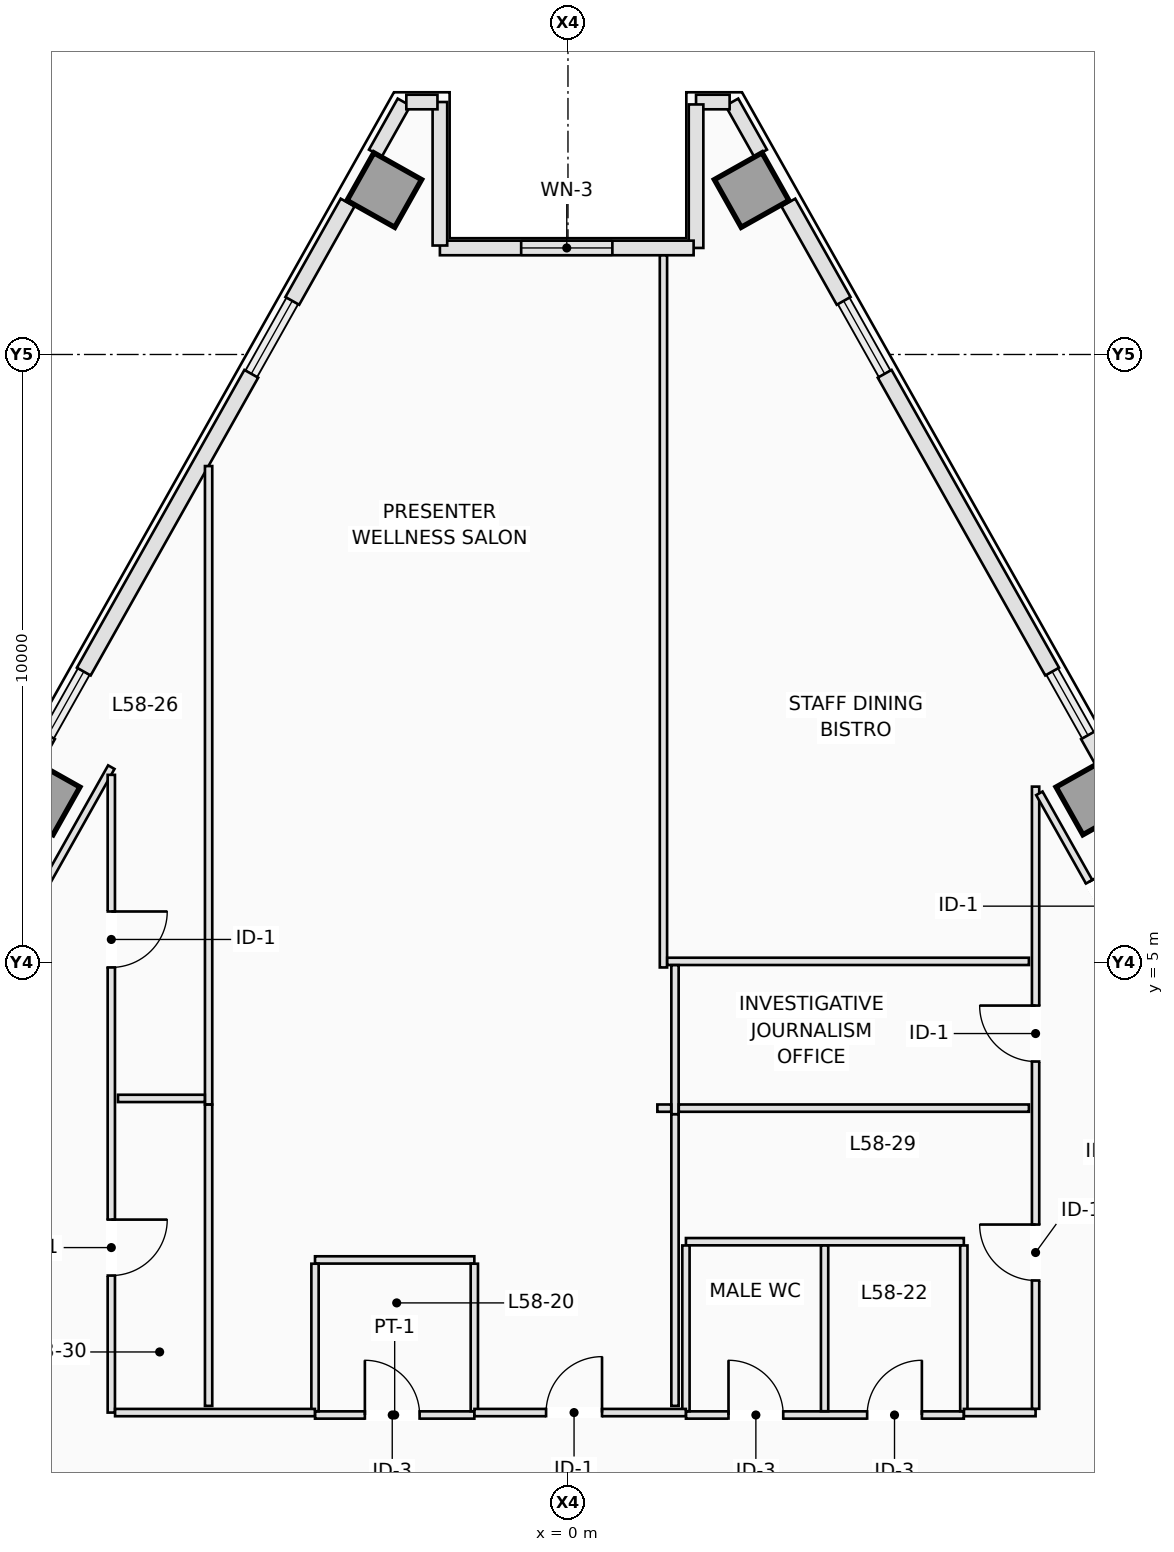
"""IFC4 building model, lengths in metres.
Left out: names, types, materials, properties, quantities, classifications, styles, units other than length and angle.
Written with IfcOpenShell. Run it as: python <this file> out.ifc"""

import sys

from ifc_helpers import new_model, si_unit, direction, frame, frame_2d, origin, origin_2d, place, context, subcontext, project, spatial, rectangle, extrude, element, fill, save


model = new_model("IFC4")
c1 = context("Model", 3, precision=1e-05, world=origin(), true_north=direction((0.0, 1.0)))
c2 = subcontext(c1, "Body", "Model", "MODEL_VIEW")
j1 = project(units=[si_unit("LENGTHUNIT", "METRE"), si_unit("PLANEANGLEUNIT", "RADIAN")], contexts=[c1])
p1 = place(None, origin())
s1 = spatial("IfcSite", under=j1, at=p1, CompositionType="ELEMENT")
p2 = place(p1, origin())
s2 = spatial("IfcBuilding", under=s1, at=p2, CompositionType="ELEMENT")
p3 = place(p2, frame((0.0, 0.0, 211.4)))
s3 = spatial("IfcBuildingStorey", under=s2, at=p3, CompositionType="ELEMENT", Elevation=211.4)
for number, where, z_axis, x_axis in (
    (1, (8.64, 7.715, 0.0), (0.0, 0.0, 1.0), (0.872, 0.49, 0.0)),
    (2, (3.021, 17.704, 0.0), (0.0, 0.0, 1.0), (0.872, 0.49, 0.0)),
    (3, (-3.021, 17.704, 0.0), (0.0, 0.0, 1.0), (-0.872, 0.49, 0.0)),
    (4, (-8.64, 7.715, 0.0), (0.0, 0.0, 1.0), (-0.872, 0.49, 0.0)),
):
    element("IfcColumn", number, at=place(p3, frame(where, z_axis=z_axis, x_axis=x_axis)), inside=s3, PredefinedType="COLUMN", context=c2, shape_type="SweptSolid", body=[
        extrude(rectangle(XDim=0.9, YDim=0.9, at=origin_2d()), origin(), (0.0, 0.0, 1.0), 3.5),
    ])
p4 = place(p3, frame((2.695, 19.149, 0.0), z_axis=(0.0, 0.0, 1.0), x_axis=(0.490345412687, -0.87152818443, 0.0)))
e5 = element("IfcWall", 5, at=p4, inside=s3, PredefinedType="STANDARD", context=c2, shape_type="SweptSolid", body=[
    extrude(rectangle(XDim=0.964, YDim=0.24, at=frame_2d((0.482, 0.0))), origin(), (0.0, 0.0, 1.0), 3.25),
])
p5 = place(p3, frame((3.624, 17.499, 0.0), z_axis=(0.0, 0.0, 1.0), x_axis=(0.490261239633, -0.871575537125, 0.0)))
e6 = element("IfcWall", 6, at=p5, inside=s3, PredefinedType="STANDARD", context=c2, shape_type="SweptSolid", body=[
    extrude(rectangle(XDim=1.855, YDim=0.26, at=frame_2d((0.928, 0.0))), origin(), (0.0, 0.0, 1.0), 3.25),
])
p6 = place(p3, frame((5.208, 14.682, 0.0), z_axis=(0.0, 0.0, 1.0), x_axis=(0.490240608828, -0.871587141631, 0.0)))
e7 = element("IfcWall", 7, at=p6, inside=s3, PredefinedType="STANDARD", context=c2, shape_type="SweptSolid", body=[
    extrude(rectangle(XDim=5.618, YDim=0.26, at=frame_2d((2.809, 0.0))), origin(), (0.0, 0.0, 1.0), 3.25),
])
p7 = place(p3, frame((8.552, 8.738, 0.0), z_axis=(0.0, 0.0, 1.0), x_axis=(0.490412424957, -0.871490478116, 0.0)))
e8 = element("IfcWall", 8, at=p7, inside=s3, PredefinedType="STANDARD", context=c2, shape_type="SweptSolid", body=[
    extrude(rectangle(XDim=0.46, YDim=0.26, at=frame_2d((0.23, 0.0))), origin(), (0.0, 0.0, 1.0), 3.25),
])
p8 = place(p3, frame((-3.168, 18.309, 0.0), z_axis=(0.0, 0.0, 1.0), x_axis=(0.490345412687, 0.87152818443, 0.0)))
e9 = element("IfcWall", 9, at=p8, inside=s3, PredefinedType="STANDARD", context=c2, shape_type="SweptSolid", body=[
    extrude(rectangle(XDim=0.964, YDim=0.24, at=frame_2d((0.482, 0.0))), origin(), (0.0, 0.0, 1.0), 3.25),
])
p9 = place(p3, frame((-8.777, 8.337, 0.0), z_axis=(0.0, 0.0, 1.0), x_axis=(0.490412424957, 0.871490478116, 0.0)))
e10 = element("IfcWall", 10, at=p9, inside=s3, PredefinedType="STANDARD", context=c2, shape_type="SweptSolid", body=[
    extrude(rectangle(XDim=0.46, YDim=0.26, at=frame_2d((0.23, 0.0))), origin(), (0.0, 0.0, 1.0), 3.25),
])
p10 = place(p3, frame((-7.962, 9.785, 0.0), z_axis=(0.0, 0.0, 1.0), x_axis=(0.490240608828, 0.871587141631, 0.0)))
e11 = element("IfcWall", 11, at=p10, inside=s3, PredefinedType="STANDARD", context=c2, shape_type="SweptSolid", body=[
    extrude(rectangle(XDim=5.618, YDim=0.26, at=frame_2d((2.809, 0.0))), origin(), (0.0, 0.0, 1.0), 3.25),
])
p11 = place(p3, frame((-4.533, 15.882, 0.0), z_axis=(0.0, 0.0, 1.0), x_axis=(0.490261239633, 0.871575537125, 0.0)))
e12 = element("IfcWall", 12, at=p11, inside=s3, PredefinedType="STANDARD", context=c2, shape_type="SweptSolid", body=[
    extrude(rectangle(XDim=1.855, YDim=0.26, at=frame_2d((0.928, 0.0))), origin(), (0.0, 0.0, 1.0), 3.25),
])
p12 = place(p3, frame((2.658, 19.152, 0.0), z_axis=(0.0, 0.0, 1.0), x_axis=(-1.0, 0.0, 0.0)))
e13 = element("IfcWall", 13, at=p12, inside=s3, PredefinedType="STANDARD", context=c2, shape_type="SweptSolid", body=[
    extrude(rectangle(XDim=0.552, YDim=0.24, at=frame_2d((0.276, 0.0))), origin(), (0.0, 0.0, 1.0), 3.25),
])
p13 = place(p3, frame((2.106, 19.112, 0.0), z_axis=(0.0, 0.0, 1.0), x_axis=(0.0, -1.0, 0.0)))
e14 = element("IfcWall", 14, at=p13, inside=s3, PredefinedType="STANDARD", context=c2, shape_type="SweptSolid", body=[
    extrude(rectangle(XDim=2.36, YDim=0.24, at=frame_2d((1.18, 0.0))), origin(), (0.0, 0.0, 1.0), 3.25),
])
p14 = place(p3, frame((2.066, 16.752, 0.0), z_axis=(0.0, 0.0, 1.0), x_axis=(-1.0, 0.0, 0.0)))
e15 = element("IfcWall", 15, at=p14, inside=s3, PredefinedType="STANDARD", context=c2, shape_type="SweptSolid", body=[
    extrude(rectangle(XDim=4.172, YDim=0.24, at=frame_2d((2.086, 0.0))), origin(), (0.0, 0.0, 1.0), 3.25),
])
p15 = place(p14, frame((1.336, 0.0, 0.9)))
e16 = element("IfcOpeningElement", 16, at=p15, cuts=e15, PredefinedType="OPENING", context=c2, shape_type="SweptSolid", body=[
    extrude(rectangle(XDim=1.5, YDim=1.95, at=frame_2d((0.75, 0.975))), frame((0.0, 0.13, 0.0), z_axis=(0.0, -1.0, 0.0), x_axis=(1.0, 0.0, 0.0)), (0.0, 0.0, 1.0), 0.26),
])
p16 = place(p3, frame((-2.106, 16.792, 0.0), z_axis=(0.0, 0.0, 1.0), x_axis=(0.0, 1.0, 0.0)))
e17 = element("IfcWall", 17, at=p16, inside=s3, PredefinedType="STANDARD", context=c2, shape_type="SweptSolid", body=[
    extrude(rectangle(XDim=2.36, YDim=0.24, at=frame_2d((1.18, 0.0))), origin(), (0.0, 0.0, 1.0), 3.25),
])
p17 = place(p3, frame((-2.146, 19.152, 0.0), z_axis=(0.0, 0.0, 1.0), x_axis=(-1.0, 0.0, 0.0)))
e18 = element("IfcWall", 18, at=p17, inside=s3, PredefinedType="STANDARD", context=c2, shape_type="SweptSolid", body=[
    extrude(rectangle(XDim=0.512, YDim=0.24, at=frame_2d((0.256, 0.0))), origin(), (0.0, 0.0, 1.0), 3.25),
])
p18 = place(p3, frame((-4.16, -2.44, 0.0), z_axis=(0.0, 0.0, 1.0), x_axis=(1.0, 0.0, 0.0)))
e19 = element("IfcWall", 19, at=p18, inside=s3, PredefinedType="PARTITIONING", context=c2, shape_type="SweptSolid", body=[
    extrude(rectangle(XDim=2.62, YDim=0.12, at=frame_2d((1.31, 0.0))), origin(), (0.0, 0.0, 1.0), 2.943),
])
p19 = place(p18, frame((0.82, 0.0, 0.0)))
e20 = element("IfcOpeningElement", 20, at=p19, cuts=e19, PredefinedType="OPENING", context=c2, shape_type="SweptSolid", body=[
    extrude(rectangle(XDim=0.9, YDim=2.12, at=frame_2d((0.45, 1.06))), frame((0.0, 0.07, 0.0), z_axis=(0.0, -1.0, 0.0), x_axis=(1.0, 0.0, 0.0)), (0.0, 0.0, 1.0), 0.14),
])
p20 = place(p3, frame((-4.16, 0.11, 0.0), z_axis=(0.0, 0.0, 1.0), x_axis=(1.0, 0.0, 0.0)))
e21 = element("IfcWall", 21, at=p20, inside=s3, PredefinedType="PARTITIONING", context=c2, shape_type="SweptSolid", body=[
    extrude(rectangle(XDim=2.62, YDim=0.12, at=frame_2d((1.31, 0.0))), origin(), (0.0, 0.0, 1.0), 3.25),
])
for number, where, z_axis, x_axis in (
    (22, (-4.16, -2.378, 0.0), (0.0, 0.0, 1.0), (0.0, 1.0, 0.0)),
    (23, (-1.54, -2.378, 0.0), (0.0, 0.0, 1.0), (0.0, 1.0, 0.0)),
):
    element("IfcWall", number, at=place(p3, frame(where, z_axis=z_axis, x_axis=x_axis)), inside=s3, PredefinedType="PARTITIONING", context=c2, shape_type="SweptSolid", body=[
        extrude(rectangle(XDim=2.426, YDim=0.12, at=frame_2d((1.213, 0.0))), origin(), (0.0, 0.0, 1.0), 3.25),
    ])
p21 = place(p3, frame((1.94, -2.44, 0.0), z_axis=(0.0, 0.0, 1.0), x_axis=(1.0, 0.0, 0.0)))
e24 = element("IfcWall", 24, at=p21, inside=s3, PredefinedType="PARTITIONING", context=c2, shape_type="SweptSolid", body=[
    extrude(rectangle(XDim=4.57, YDim=0.12, at=frame_2d((2.285, 0.0))), origin(), (0.0, 0.0, 1.0), 2.943),
])
p22 = place(p21, frame((0.7, 0.0, 0.0)))
e25 = element("IfcOpeningElement", 25, at=p22, cuts=e24, PredefinedType="OPENING", context=c2, shape_type="SweptSolid", body=[
    extrude(rectangle(XDim=0.9, YDim=2.12, at=frame_2d((0.45, 1.06))), frame((0.0, 0.07, 0.0), z_axis=(0.0, -1.0, 0.0), x_axis=(1.0, 0.0, 0.0)), (0.0, 0.0, 1.0), 0.14),
])
p23 = place(p21, frame((2.98, 0.0, 0.0)))
e26 = element("IfcOpeningElement", 26, at=p23, cuts=e24, PredefinedType="OPENING", context=c2, shape_type="SweptSolid", body=[
    extrude(rectangle(XDim=0.9, YDim=2.12, at=frame_2d((0.45, 1.06))), frame((0.0, 0.07, 0.0), z_axis=(0.0, -1.0, 0.0), x_axis=(1.0, 0.0, 0.0)), (0.0, 0.0, 1.0), 0.14),
])
p24 = place(p3, frame((1.94, 0.41, 0.0), z_axis=(0.0, 0.0, 1.0), x_axis=(1.0, 0.0, 0.0)))
e27 = element("IfcWall", 27, at=p24, inside=s3, PredefinedType="PARTITIONING", context=c2, shape_type="SweptSolid", body=[
    extrude(rectangle(XDim=4.57, YDim=0.12, at=frame_2d((2.285, 0.0))), origin(), (0.0, 0.0, 1.0), 3.25),
])
for number, where, z_axis, x_axis in (
    (28, (1.94, -2.378, 0.0), (0.0, 0.0, 1.0), (0.0, 1.0, 0.0)),
    (29, (4.22, -2.378, 0.0), (0.0, 0.0, 1.0), (0.0, 1.0, 0.0)),
    (30, (6.51, -2.378, 0.0), (0.0, 0.0, 1.0), (0.0, 1.0, 0.0)),
):
    element("IfcWall", number, at=place(p3, frame(where, z_axis=z_axis, x_axis=x_axis)), inside=s3, PredefinedType="PARTITIONING", context=c2, shape_type="SweptSolid", body=[
        extrude(rectangle(XDim=2.726, YDim=0.12, at=frame_2d((1.363, 0.0))), origin(), (0.0, 0.0, 1.0), 3.25),
    ])
p25 = place(p3, frame((-9.409, 4.838, 0.0), z_axis=(0.0, 0.0, 1.0), x_axis=(0.490276203052, 0.871567120032, 0.0)))
e31 = element("IfcWall", 31, at=p25, inside=s3, PredefinedType="PARTITIONING", context=c2, shape_type="SweptSolid", body=[
    extrude(rectangle(XDim=3.873, YDim=0.12, at=frame_2d((1.937, 0.0))), origin(), (0.0, 0.0, 1.0), 3.25),
])
p26 = place(p3, frame((-7.51, 8.087, 0.0), z_axis=(0.0, 0.0, 1.0), x_axis=(0.0, -1.0, 0.0)))
e32 = element("IfcWall", 32, at=p26, inside=s3, PredefinedType="PARTITIONING", context=c2, shape_type="SweptSolid", body=[
    extrude(rectangle(XDim=10.487, YDim=0.12, at=frame_2d((5.244, 0.0))), origin(), (0.0, 0.0, 1.0), 3.25),
])
p27 = place(p26, frame((2.247, 0.0, 0.0)))
e33 = element("IfcOpeningElement", 33, at=p27, cuts=e32, PredefinedType="OPENING", context=c2, shape_type="SweptSolid", body=[
    extrude(rectangle(XDim=0.92, YDim=2.12, at=frame_2d((0.46, 1.06))), frame((0.0, 0.07, 0.0), z_axis=(0.0, -1.0, 0.0), x_axis=(1.0, 0.0, 0.0)), (0.0, 0.0, 1.0), 0.14),
])
p28 = place(p26, frame((7.314, 0.0, 0.0)))
e34 = element("IfcOpeningElement", 34, at=p28, cuts=e32, PredefinedType="OPENING", context=c2, shape_type="SweptSolid", body=[
    extrude(rectangle(XDim=0.92, YDim=2.12, at=frame_2d((0.46, 1.06))), frame((0.0, 0.07, 0.0), z_axis=(0.0, -1.0, 0.0), x_axis=(1.0, 0.0, 0.0)), (0.0, 0.0, 1.0), 0.14),
])
p29 = place(p3, frame((-7.448, -2.4, 0.0), z_axis=(0.0, 0.0, 1.0), x_axis=(1.0, 0.0, 0.0)))
e35 = element("IfcWall", 35, at=p29, inside=s3, PredefinedType="PARTITIONING", context=c2, shape_type="SweptSolid", body=[
    extrude(rectangle(XDim=3.286, YDim=0.12, at=frame_2d((1.643, 0.0))), origin(), (0.0, 0.0, 1.0), 3.25),
])
p30 = place(p3, frame((-1.538, -2.4, 0.0), z_axis=(0.0, 0.0, 1.0), x_axis=(1.0, 0.0, 0.0)))
e36 = element("IfcWall", 36, at=p30, inside=s3, PredefinedType="PARTITIONING", context=c2, shape_type="SweptSolid", body=[
    extrude(rectangle(XDim=3.476, YDim=0.12, at=frame_2d((1.738, 0.0))), origin(), (0.0, 0.0, 1.0), 2.943),
])
p31 = place(p30, frame((1.178, 0.0, 0.0)))
e37 = element("IfcOpeningElement", 37, at=p31, cuts=e36, PredefinedType="OPENING", context=c2, shape_type="SweptSolid", body=[
    extrude(rectangle(XDim=0.92, YDim=2.12, at=frame_2d((0.46, 1.06))), frame((0.0, 0.07, 0.0), z_axis=(0.0, -1.0, 0.0), x_axis=(1.0, 0.0, 0.0)), (0.0, 0.0, 1.0), 0.14),
])
p32 = place(p3, frame((6.512, -2.4, 0.0), z_axis=(0.0, 0.0, 1.0), x_axis=(1.0, 0.0, 0.0)))
e38 = element("IfcWall", 38, at=p32, inside=s3, PredefinedType="PARTITIONING", context=c2, shape_type="SweptSolid", body=[
    extrude(rectangle(XDim=1.178, YDim=0.12, at=frame_2d((0.589, 0.0))), origin(), (0.0, 0.0, 1.0), 3.25),
])
p33 = place(p3, frame((7.69, -2.338, 0.0), z_axis=(0.0, 0.0, 1.0), x_axis=(0.0, 1.0, 0.0)))
e39 = element("IfcWall", 39, at=p33, inside=s3, PredefinedType="PARTITIONING", context=c2, shape_type="SweptSolid", body=[
    extrude(rectangle(XDim=10.232, YDim=0.12, at=frame_2d((5.116, 0.0))), origin(), (0.0, 0.0, 1.0), 3.25),
])
p34 = place(p33, frame((5.711, 0.0, 0.0)))
e40 = element("IfcOpeningElement", 40, at=p34, cuts=e39, PredefinedType="OPENING", context=c2, shape_type="SweptSolid", body=[
    extrude(rectangle(XDim=0.92, YDim=2.12, at=frame_2d((0.46, 1.06))), frame((0.0, 0.07, 0.0), z_axis=(0.0, -1.0, 0.0), x_axis=(1.0, 0.0, 0.0)), (0.0, 0.0, 1.0), 0.14),
])
p35 = place(p33, frame((2.11, 0.0, 0.0)))
e41 = element("IfcOpeningElement", 41, at=p35, cuts=e39, PredefinedType="OPENING", context=c2, shape_type="SweptSolid", body=[
    extrude(rectangle(XDim=0.92, YDim=2.12, at=frame_2d((0.46, 1.06))), frame((0.0, 0.07, 0.0), z_axis=(0.0, -1.0, 0.0), x_axis=(1.0, 0.0, 0.0)), (0.0, 0.0, 1.0), 0.14),
])
p36 = place(p3, frame((7.752, 7.783, 0.0), z_axis=(0.0, 0.0, 1.0), x_axis=(0.490285973315, -0.871561623966, 0.0)))
e42 = element("IfcWall", 42, at=p36, inside=s3, PredefinedType="PARTITIONING", context=c2, shape_type="SweptSolid", body=[
    extrude(rectangle(XDim=3.749, YDim=0.12, at=frame_2d((1.875, 0.0))), origin(), (0.0, 0.0, 1.0), 3.25),
])
p37 = place(p36, frame((1.669, 0.0, 0.0)))
e43 = element("IfcOpeningElement", 43, at=p37, cuts=e42, PredefinedType="OPENING", context=c2, shape_type="SweptSolid", body=[
    extrude(rectangle(XDim=0.92, YDim=2.12, at=frame_2d((0.46, 1.06))), frame((0.0, 0.07, 0.0), z_axis=(0.0, -1.0, 0.0), x_axis=(1.0, 0.0, 0.0)), (0.0, 0.0, 1.0), 0.14),
])
p38 = place(p3, frame((1.57, 4.92, 0.0), z_axis=(0.0, 0.0, 1.0), x_axis=(0.0, 1.0, 0.0)))
e44 = element("IfcWall", 44, at=p38, inside=s3, PredefinedType="PARTITIONING", context=c2, shape_type="SweptSolid", body=[
    extrude(rectangle(XDim=11.71, YDim=0.12, at=frame_2d((5.855, 0.0))), origin(), (0.0, 0.0, 1.0), 3.25),
])
p39 = place(p3, frame((7.58, 5.02, 0.0), z_axis=(0.0, 0.0, 1.0), x_axis=(-1.0, 0.0, 0.0)))
e45 = element("IfcWall", 45, at=p39, inside=s3, PredefinedType="PARTITIONING", context=c2, shape_type="SweptSolid", body=[
    extrude(rectangle(XDim=5.948, YDim=0.12, at=frame_2d((2.974, 0.0))), origin(), (0.0, 0.0, 1.0), 3.25),
])
p40 = place(p3, frame((-5.91, 2.667, 0.0), z_axis=(0.0, 0.0, 1.0), x_axis=(0.0, 1.0, 0.0)))
e46 = element("IfcWall", 46, at=p40, inside=s3, PredefinedType="PARTITIONING", context=c2, shape_type="SweptSolid", body=[
    extrude(rectangle(XDim=10.499, YDim=0.12, at=frame_2d((5.249, 0.0))), origin(), (0.0, 0.0, 1.0), 3.25),
])
p41 = place(p3, frame((1.76, 4.958, 0.0), z_axis=(0.0, 0.0, 1.0), x_axis=(0.0, -1.0, 0.0)))
e47 = element("IfcWall", 47, at=p41, inside=s3, PredefinedType="PARTITIONING", context=c2, shape_type="SweptSolid", body=[
    extrude(rectangle(XDim=2.452, YDim=0.12, at=frame_2d((1.226, 0.0))), origin(), (0.0, 0.0, 1.0), 3.25),
])
p42 = place(p3, frame((1.76, 2.504, 0.0), z_axis=(0.0, 0.0, 1.0), x_axis=(0.0, -1.0, 0.0)))
e48 = element("IfcWall", 48, at=p42, inside=s3, PredefinedType="PARTITIONING", context=c2, shape_type="SweptSolid", body=[
    extrude(rectangle(XDim=4.794, YDim=0.12, at=frame_2d((2.397, 0.0))), origin(), (0.0, 0.0, 1.0), 3.25),
])
p43 = place(p3, frame((-5.91, -2.29, 0.0), z_axis=(0.0, 0.0, 1.0), x_axis=(0.0, 1.0, 0.0)))
e49 = element("IfcWall", 49, at=p43, inside=s3, PredefinedType="PARTITIONING", context=c2, shape_type="SweptSolid", body=[
    extrude(rectangle(XDim=4.954, YDim=0.12, at=frame_2d((2.477, 0.0))), origin(), (0.0, 0.0, 1.0), 3.25),
])
p44 = place(p3, frame((-5.972, 2.766, 0.0), z_axis=(0.0, 0.0, 1.0), x_axis=(-1.0, 0.0, 0.0)))
e50 = element("IfcWall", 50, at=p44, inside=s3, PredefinedType="PARTITIONING", context=c2, shape_type="SweptSolid", body=[
    extrude(rectangle(XDim=1.428, YDim=0.12, at=frame_2d((0.714, 0.0))), origin(), (0.0, 0.0, 1.0), 2.943),
])
p45 = place(p3, frame((7.58, 2.606, 0.0), z_axis=(0.0, 0.0, 1.0), x_axis=(-1.0, 0.0, 0.0)))
e51 = element("IfcWall", 51, at=p45, inside=s3, PredefinedType="PARTITIONING", context=c2, shape_type="SweptSolid", body=[
    extrude(rectangle(XDim=5.758, YDim=0.12, at=frame_2d((2.879, 0.0))), origin(), (0.0, 0.0, 1.0), 2.943),
])
p46 = place(p3, frame((1.698, 2.606, 0.0), z_axis=(0.0, 0.0, 1.0), x_axis=(-1.0, 0.0, 0.0)))
e52 = element("IfcWall", 52, at=p46, inside=s3, PredefinedType="PARTITIONING", context=c2, shape_type="SweptSolid", body=[
    extrude(rectangle(XDim=0.228, YDim=0.12, at=frame_2d((0.114, 0.0))), origin(), (0.0, 0.0, 1.0), 2.943),
])
p47 = place(p15, origin())
e53 = element("IfcWindow", 53, at=p47, inside=s3, PartitioningType="SINGLE_PANEL", PredefinedType="WINDOW", context=c2, shape_type="SweptSolid", body=[
    extrude(rectangle(XDim=1.5, YDim=1.95, at=frame_2d((0.75, 0.975))), frame((0.0, 0.03, 0.0), z_axis=(0.0, -1.0, 0.0), x_axis=(1.0, 0.0, 0.0)), (0.0, 0.0, 1.0), 0.06),
])
fill(e16, e53)
p48 = place(p19, origin())
e54 = element("IfcDoor", 54, at=p48, inside=s3, OperationType="SINGLE_SWING_LEFT", PredefinedType="DOOR", context=c2, shape_type="SweptSolid", body=[
    extrude(rectangle(XDim=0.9, YDim=2.12, at=frame_2d((0.45, 1.06))), frame((0.0, 0.025, 0.0), z_axis=(0.0, -1.0, 0.0), x_axis=(1.0, 0.0, 0.0)), (0.0, 0.0, 1.0), 0.05),
])
fill(e20, e54)
p49 = place(p22, origin())
e55 = element("IfcDoor", 55, at=p49, inside=s3, OperationType="SINGLE_SWING_LEFT", PredefinedType="DOOR", context=c2, shape_type="SweptSolid", body=[
    extrude(rectangle(XDim=0.9, YDim=2.12, at=frame_2d((0.45, 1.06))), frame((0.0, 0.025, 0.0), z_axis=(0.0, -1.0, 0.0), x_axis=(1.0, 0.0, 0.0)), (0.0, 0.0, 1.0), 0.05),
])
fill(e25, e55)
p50 = place(p23, origin())
e56 = element("IfcDoor", 56, at=p50, inside=s3, OperationType="SINGLE_SWING_RIGHT", PredefinedType="DOOR", context=c2, shape_type="SweptSolid", body=[
    extrude(rectangle(XDim=0.9, YDim=2.12, at=frame_2d((0.45, 1.06))), frame((0.0, 0.025, 0.0), z_axis=(0.0, -1.0, 0.0), x_axis=(1.0, 0.0, 0.0)), (0.0, 0.0, 1.0), 0.05),
])
fill(e26, e56)
p51 = place(p37, origin())
e57 = element("IfcDoor", 57, at=p51, inside=s3, OperationType="SINGLE_SWING_LEFT", PredefinedType="DOOR", context=c2, shape_type="SweptSolid", body=[
    extrude(rectangle(XDim=0.92, YDim=2.12, at=frame_2d((0.46, 1.06))), frame((0.0, 0.025, 0.0), z_axis=(0.0, -1.0, 0.0), x_axis=(1.0, 0.0, 0.0)), (0.0, 0.0, 1.0), 0.05),
])
fill(e43, e57)
p52 = place(p31, origin())
e58 = element("IfcDoor", 58, at=p52, inside=s3, OperationType="SINGLE_SWING_RIGHT", PredefinedType="DOOR", context=c2, shape_type="SweptSolid", body=[
    extrude(rectangle(XDim=0.92, YDim=2.12, at=frame_2d((0.46, 1.06))), frame((0.0, 0.025, 0.0), z_axis=(0.0, -1.0, 0.0), x_axis=(1.0, 0.0, 0.0)), (0.0, 0.0, 1.0), 0.05),
])
fill(e37, e58)
p53 = place(p27, origin())
e59 = element("IfcDoor", 59, at=p53, inside=s3, OperationType="SINGLE_SWING_LEFT", PredefinedType="DOOR", context=c2, shape_type="SweptSolid", body=[
    extrude(rectangle(XDim=0.92, YDim=2.12, at=frame_2d((0.46, 1.06))), frame((0.0, 0.025, 0.0), z_axis=(0.0, -1.0, 0.0), x_axis=(1.0, 0.0, 0.0)), (0.0, 0.0, 1.0), 0.05),
])
fill(e33, e59)
p54 = place(p34, origin())
e60 = element("IfcDoor", 60, at=p54, inside=s3, OperationType="SINGLE_SWING_RIGHT", PredefinedType="DOOR", context=c2, shape_type="SweptSolid", body=[
    extrude(rectangle(XDim=0.92, YDim=2.12, at=frame_2d((0.46, 1.06))), frame((0.0, 0.025, 0.0), z_axis=(0.0, -1.0, 0.0), x_axis=(1.0, 0.0, 0.0)), (0.0, 0.0, 1.0), 0.05),
])
fill(e40, e60)
p55 = place(p35, origin())
e61 = element("IfcDoor", 61, at=p55, inside=s3, OperationType="SINGLE_SWING_RIGHT", PredefinedType="DOOR", context=c2, shape_type="SweptSolid", body=[
    extrude(rectangle(XDim=0.92, YDim=2.12, at=frame_2d((0.46, 1.06))), frame((0.0, 0.025, 0.0), z_axis=(0.0, -1.0, 0.0), x_axis=(1.0, 0.0, 0.0)), (0.0, 0.0, 1.0), 0.05),
])
fill(e41, e61)
p56 = place(p28, origin())
e62 = element("IfcDoor", 62, at=p56, inside=s3, OperationType="SINGLE_SWING_LEFT", PredefinedType="DOOR", context=c2, shape_type="SweptSolid", body=[
    extrude(rectangle(XDim=0.92, YDim=2.12, at=frame_2d((0.46, 1.06))), frame((0.0, 0.025, 0.0), z_axis=(0.0, -1.0, 0.0), x_axis=(1.0, 0.0, 0.0)), (0.0, 0.0, 1.0), 0.05),
])
fill(e34, e62)
save(model, sys.argv[1])
